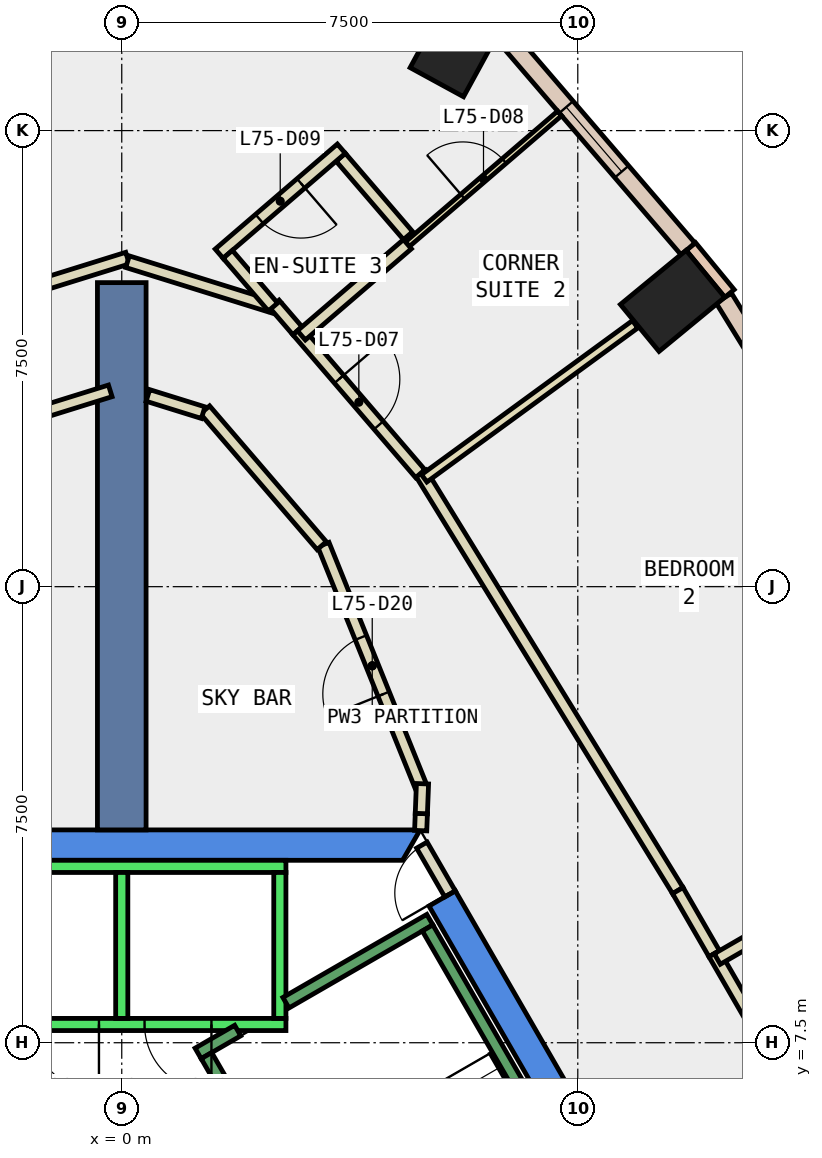
"""IFC4 building model, lengths in metres.
Left out: names, types, materials, properties, quantities, classifications, styles, units other than length and angle.
Written with IfcOpenShell. Run it as: python <this file> out.ifc"""

import sys

from ifc_helpers import new_model, si_unit, direction, frame, frame_2d, origin, origin_2d, place, context, subcontext, project, spatial, polyline, rectangle, outline, extrude, element, fill, save


model = new_model("IFC4")
c1 = context("Model", 3, precision=1e-05, world=origin(), true_north=direction((0.0, 1.0)))
c2 = subcontext(c1, "Body", "Model", "MODEL_VIEW")
j1 = project(units=[si_unit("LENGTHUNIT", "METRE"), si_unit("PLANEANGLEUNIT", "RADIAN")], contexts=[c1])
p1 = place(None, origin())
s1 = spatial("IfcSite", under=j1, at=p1, CompositionType="ELEMENT")
p2 = place(p1, origin())
s2 = spatial("IfcBuilding", under=s1, at=p2, CompositionType="ELEMENT")
p3 = place(p2, frame((0.0, 0.0, 318.8)))
s3 = spatial("IfcBuildingStorey", under=s2, at=p3, CompositionType="ELEMENT", Elevation=318.8)
for number, where, z_axis, x_axis in (
    (1, (9.059, 19.7, -0.34), (0.0, 0.0, 1.0), (-0.636, 0.772, 0.0)),
    (2, (5.517, 23.911, -0.34), (0.0, 0.0, 1.0), (-0.878, 0.479, 0.0)),
):
    element("IfcColumn", number, at=place(p3, frame(where, z_axis=z_axis, x_axis=x_axis)), inside=s3, PredefinedType="COLUMN", context=c2, shape_type="SweptSolid", body=[
        extrude(rectangle(XDim=1.0, YDim=1.4, at=origin_2d()), origin(), (0.0, 0.0, 1.0), 3.6),
    ])
p4 = place(p3, frame((0.0, 0.0, -0.34)))
e3 = element("IfcWall", 3, at=p4, inside=s3, PredefinedType="SHEAR", context=c2, shape_type="SweptSolid", body=[
    extrude(outline(polyline([(5.486, 9.998), (5.053, 9.748), (9.238, 2.5), (9.815, 2.5), (5.486, 9.998)])), origin(), (0.0, 0.0, 1.0), 3.6),
])
p5 = place(p3, frame((0.0, 0.0, -0.34)))
e4 = element("IfcWall", 4, at=p5, inside=s3, PredefinedType="SHEAR", context=c2, shape_type="SweptSolid", body=[
    extrude(outline(polyline([(4.907, 11.0), (-4.907, 11.0), (-4.619, 10.5), (4.619, 10.5), (4.907, 11.0)])), origin(), (0.0, 0.0, 1.0), 3.6),
])
p6 = place(p3, frame((0.0, 11.0, -0.34), z_axis=(0.0, 0.0, 1.0), x_axis=(0.0, 1.0, 0.0)))
e5 = element("IfcWall", 5, at=p6, inside=s3, PredefinedType="SHEAR", context=c2, shape_type="SweptSolid", body=[
    extrude(rectangle(XDim=9.0, YDim=0.8, at=frame_2d((4.5, 0.0))), origin(), (0.0, 0.0, 1.0), 3.6),
])
p7 = place(p3, frame((9.995, 19.822, 0.0), z_axis=(0.0, 0.0, 1.0), x_axis=(-0.635998056672, 0.771690658172, 0.0)))
e6 = element("IfcWall", 6, at=p7, inside=s3, PredefinedType="STANDARD", context=c2, shape_type="SweptSolid", body=[
    extrude(rectangle(XDim=1.0, YDim=0.2, at=frame_2d((0.5, 0.0))), origin(), (0.0, 0.0, 1.0), 3.26),
])
p8 = place(p3, frame((13.823, 13.372, 0.0), z_axis=(0.0, 0.0, 1.0), x_axis=(-0.524004608874, 0.851715427757, 0.0)))
e7 = element("IfcWall", 7, at=p8, inside=s3, PredefinedType="STANDARD", context=c2, shape_type="SweptSolid", body=[
    extrude(rectangle(XDim=7.485, YDim=0.3, at=frame_2d((3.742, 0.0))), origin(), (0.0, 0.0, 1.0), 3.26),
])
p9 = place(p8, frame((0.771, 0.0, 0.9)))
e8 = element("IfcOpeningElement", 8, at=p9, cuts=e7, PredefinedType="OPENING", context=c2, shape_type="SweptSolid", body=[
    extrude(rectangle(XDim=2.2, YDim=2.0, at=frame_2d((1.1, 1.0))), frame((0.0, 0.16, 0.0), z_axis=(0.0, -1.0, 0.0), x_axis=(1.0, 0.0, 0.0)), (0.0, 0.0, 1.0), 0.32),
])
p10 = place(p8, frame((4.514, 0.0, 0.9)))
e9 = element("IfcOpeningElement", 9, at=p10, cuts=e7, PredefinedType="OPENING", context=c2, shape_type="SweptSolid", body=[
    extrude(rectangle(XDim=2.2, YDim=2.0, at=frame_2d((1.1, 1.0))), frame((0.0, 0.16, 0.0), z_axis=(0.0, -1.0, 0.0), x_axis=(1.0, 0.0, 0.0)), (0.0, 0.0, 1.0), 0.32),
])
p11 = place(p3, frame((9.313, 20.555, 0.0), z_axis=(0.0, 0.0, 1.0), x_axis=(-0.651684474108, 0.758490175419, 0.0)))
e10 = element("IfcWall", 10, at=p11, inside=s3, PredefinedType="STANDARD", context=c2, shape_type="SweptSolid", body=[
    extrude(rectangle(XDim=4.748, YDim=0.3, at=frame_2d((2.374, 0.0))), origin(), (0.0, 0.0, 1.0), 3.26),
])
p12 = place(p11, frame((1.674, 0.0, 0.9)))
e11 = element("IfcOpeningElement", 11, at=p12, cuts=e10, PredefinedType="OPENING", context=c2, shape_type="SweptSolid", body=[
    extrude(rectangle(XDim=1.4, YDim=2.0, at=frame_2d((0.7, 1.0))), frame((0.0, 0.16, 0.0), z_axis=(0.0, -1.0, 0.0), x_axis=(1.0, 0.0, 0.0)), (0.0, 0.0, 1.0), 0.32),
])
p13 = place(p3, frame((4.916, 10.988, 0.0), z_axis=(0.0, 0.0, 1.0), x_axis=(0.039066592023, 0.999236609311, 0.0)))
e12 = element("IfcWall", 12, at=p13, inside=s3, PredefinedType="PARTITIONING", context=c2, shape_type="SweptSolid", body=[
    extrude(rectangle(XDim=0.281, YDim=0.2, at=frame_2d((0.141, 0.0))), origin(), (0.0, 0.0, 1.0), 2.4),
])
p14 = place(p3, frame((4.923, 11.707, 0.0), z_axis=(0.0, 0.0, 1.0), x_axis=(-0.374122865642, 0.927379146522, 0.0)))
e13 = element("IfcWall", 13, at=p14, inside=s3, PredefinedType="PARTITIONING", context=c2, shape_type="SweptSolid", body=[
    extrude(rectangle(XDim=4.296, YDim=0.2, at=frame_2d((2.148, 0.0))), origin(), (0.0, 0.0, 1.0), 3.26),
])
p15 = place(p14, frame((1.648, 0.0, 0.0)))
e14 = element("IfcOpeningElement", 14, at=p15, cuts=e13, PredefinedType="OPENING", context=c2, shape_type="SweptSolid", body=[
    extrude(rectangle(XDim=1.0, YDim=2.1, at=frame_2d((0.5, 1.05))), frame((0.0, 0.11, 0.0), z_axis=(0.0, -1.0, 0.0), x_axis=(1.0, 0.0, 0.0)), (0.0, 0.0, 1.0), 0.22),
])
p16 = place(p3, frame((3.289, 15.674, 0.0), z_axis=(0.0, 0.0, 1.0), x_axis=(-0.651848676423, 0.758349064116, 0.0)))
e15 = element("IfcWall", 15, at=p16, inside=s3, PredefinedType="PARTITIONING", context=c2, shape_type="SweptSolid", body=[
    extrude(rectangle(XDim=2.946, YDim=0.2, at=frame_2d((1.473, 0.0))), origin(), (0.0, 0.0, 1.0), 3.26),
])
p17 = place(p3, frame((1.339, 17.862, 0.0), z_axis=(0.0, 0.0, 1.0), x_axis=(-0.954826063502, 0.297165254457, 0.0)))
e16 = element("IfcWall", 16, at=p17, inside=s3, PredefinedType="PARTITIONING", context=c2, shape_type="SweptSolid", body=[
    extrude(rectangle(XDim=0.952, YDim=0.2, at=frame_2d((0.476, 0.0))), origin(), (0.0, 0.0, 1.0), 3.26),
])
p18 = place(p3, frame((-0.189, 18.22, 0.0), z_axis=(0.0, 0.0, 1.0), x_axis=(-0.954836332451, -0.297132257137, 0.0)))
e17 = element("IfcWall", 17, at=p18, inside=s3, PredefinedType="PARTITIONING", context=c2, shape_type="SweptSolid", body=[
    extrude(rectangle(XDim=1.205, YDim=0.2, at=frame_2d((0.602, 0.0))), origin(), (0.0, 0.0, 1.0), 3.26),
])
p19 = place(p3, frame((4.922, 16.867, 0.0), z_axis=(0.0, 0.0, 1.0), x_axis=(0.523943621984, -0.851752945978, 0.0)))
e18 = element("IfcWall", 18, at=p19, inside=s3, PredefinedType="PARTITIONING", context=c2, shape_type="SweptSolid", body=[
    extrude(rectangle(XDim=8.06, YDim=0.2, at=frame_2d((4.03, 0.0))), origin(), (0.0, 0.0, 1.0), 3.26),
])
p20 = place(p3, frame((9.145, 10.002, 0.0), z_axis=(0.0, 0.0, 1.0), x_axis=(0.499798886082, -0.866141485827, 0.0)))
e19 = element("IfcWall", 19, at=p20, inside=s3, PredefinedType="PARTITIONING", context=c2, shape_type="SweptSolid", body=[
    extrude(rectangle(XDim=1.198, YDim=0.2, at=frame_2d((0.599, 0.0))), origin(), (0.0, 0.0, 1.0), 3.26),
])
p21 = place(p3, frame((9.744, 8.964, 0.0), z_axis=(0.0, 0.0, 1.0), x_axis=(0.500290307618, -0.865857729713, 0.0)))
e20 = element("IfcWall", 20, at=p21, inside=s3, PredefinedType="PARTITIONING", context=c2, shape_type="SweptSolid", body=[
    extrude(rectangle(XDim=3.2, YDim=0.2, at=frame_2d((1.6, 0.0))), origin(), (0.0, 0.0, 1.0), 3.26),
])
p22 = place(p3, frame((2.889, 19.209, 0.0), z_axis=(0.0, 0.0, 1.0), x_axis=(0.651686040861, -0.758488829283, 0.0)))
e21 = element("IfcWall", 21, at=p22, inside=s3, PredefinedType="PARTITIONING", context=c2, shape_type="SweptSolid", body=[
    extrude(rectangle(XDim=3.1, YDim=0.2, at=frame_2d((1.55, 0.0))), origin(), (0.0, 0.0, 1.0), 3.26),
])
p23 = place(p22, frame((1.05, 0.0, 0.0)))
e22 = element("IfcOpeningElement", 22, at=p23, cuts=e21, PredefinedType="OPENING", context=c2, shape_type="SweptSolid", body=[
    extrude(rectangle(XDim=1.0, YDim=2.1, at=frame_2d((0.5, 1.05))), frame((0.0, 0.11, 0.0), z_axis=(0.0, -1.0, 0.0), x_axis=(1.0, 0.0, 0.0)), (0.0, 0.0, 1.0), 0.22),
])
p24 = place(p3, frame((-2.482, 19.601, 0.0), z_axis=(0.0, 0.0, 1.0), x_axis=(0.95482540871, 0.297167358372, 0.0)))
e23 = element("IfcWall", 23, at=p24, inside=s3, PredefinedType="PARTITIONING", context=c2, shape_type="SweptSolid", body=[
    extrude(rectangle(XDim=2.699, YDim=0.2, at=frame_2d((1.349, 0.0))), origin(), (0.0, 0.0, 1.0), 3.26),
])
p25 = place(p3, frame((0.095, 20.344, 0.0), z_axis=(0.0, 0.0, 1.0), x_axis=(0.954837867825, -0.297127323158, 0.0)))
e24 = element("IfcWall", 24, at=p25, inside=s3, PredefinedType="PARTITIONING", context=c2, shape_type="SweptSolid", body=[
    extrude(rectangle(XDim=2.605, YDim=0.2, at=frame_2d((1.302, 0.0))), origin(), (0.0, 0.0, 1.0), 3.26),
])
p26 = place(p3, frame((2.512, 19.647, 0.0), z_axis=(0.0, 0.0, 1.0), x_axis=(0.652320947019, -0.757942862016, 0.0)))
e25 = element("IfcWall", 25, at=p26, inside=s3, PredefinedType="PARTITIONING", context=c2, shape_type="SweptSolid", body=[
    extrude(rectangle(XDim=0.578, YDim=0.2, at=frame_2d((0.289, 0.0))), origin(), (0.0, 0.0, 1.0), 3.26),
])
p27 = place(p3, frame((11.959, 10.127, 0.0), z_axis=(0.0, 0.0, 1.0), x_axis=(-0.866022959057, -0.500004234368, 0.0)))
e26 = element("IfcWall", 26, at=p27, inside=s3, PredefinedType="PARTITIONING", context=c2, shape_type="SweptSolid", body=[
    extrude(rectangle(XDim=2.5, YDim=0.2, at=frame_2d((1.25, 0.0))), origin(), (0.0, 0.0, 1.0), 3.26),
])
p28 = place(p3, frame((4.974, 16.782, 0.0), z_axis=(0.0, 0.0, 1.0), x_axis=(0.807621211013, 0.589701602102, 0.0)))
e27 = element("IfcWall", 27, at=p28, inside=s3, PredefinedType="PARTITIONING", context=c2, shape_type="SweptSolid", body=[
    extrude(rectangle(XDim=4.295, YDim=0.15, at=frame_2d((2.148, 0.0))), origin(), (0.0, 0.0, 1.0), 3.26),
])
p29 = place(p3, frame((4.698, 20.632, 0.0), z_axis=(0.0, 0.0, 1.0), x_axis=(0.75843091069, 0.651753445491, 0.0)))
e28 = element("IfcWall", 28, at=p29, inside=s3, PredefinedType="PARTITIONING", context=c2, shape_type="SweptSolid", body=[
    extrude(rectangle(XDim=3.3, YDim=0.1, at=frame_2d((1.65, 0.0))), origin(), (0.0, 0.0, 1.0), 3.26),
])
p30 = place(p29, frame((1.2, 0.0, 0.0)))
e29 = element("IfcOpeningElement", 29, at=p30, cuts=e28, PredefinedType="OPENING", context=c2, shape_type="SweptSolid", body=[
    extrude(rectangle(XDim=0.9, YDim=2.1, at=frame_2d((0.45, 1.05))), frame((0.0, 0.06, 0.0), z_axis=(0.0, -1.0, 0.0), x_axis=(1.0, 0.0, 0.0)), (0.0, 0.0, 1.0), 0.12),
])
p31 = place(p3, frame((2.954, 19.133, 0.0), z_axis=(0.0, 0.0, 1.0), x_axis=(0.758341579104, 0.65185738425, 0.0)))
e30 = element("IfcWall", 30, at=p31, inside=s3, PredefinedType="PARTITIONING", context=c2, shape_type="SweptSolid", body=[
    extrude(rectangle(XDim=2.3, YDim=0.2, at=frame_2d((1.15, 0.0))), origin(), (0.0, 0.0, 1.0), 3.26),
])
p32 = place(p3, frame((4.709, 20.773, 0.0), z_axis=(0.0, 0.0, 1.0), x_axis=(-0.651808051275, 0.758383982092, 0.0)))
e31 = element("IfcWall", 31, at=p32, inside=s3, PredefinedType="PARTITIONING", context=c2, shape_type="SweptSolid", body=[
    extrude(rectangle(XDim=1.7, YDim=0.2, at=frame_2d((0.85, 0.0))), origin(), (0.0, 0.0, 1.0), 3.26),
])
p33 = place(p3, frame((3.611, 22.203, 0.0), z_axis=(0.0, 0.0, 1.0), x_axis=(-0.75836467248, -0.651830517493, 0.0)))
e32 = element("IfcWall", 32, at=p33, inside=s3, PredefinedType="PARTITIONING", context=c2, shape_type="SweptSolid", body=[
    extrude(rectangle(XDim=2.649, YDim=0.2, at=frame_2d((1.325, 0.0))), origin(), (0.0, 0.0, 1.0), 3.26),
])
p34 = place(p33, frame((0.875, 0.0, 0.0)))
e33 = element("IfcOpeningElement", 33, at=p34, cuts=e32, PredefinedType="OPENING", context=c2, shape_type="SweptSolid", body=[
    extrude(rectangle(XDim=0.9, YDim=2.1, at=frame_2d((0.45, 1.05))), frame((0.0, 0.11, 0.0), z_axis=(0.0, -1.0, 0.0), x_axis=(1.0, 0.0, 0.0)), (0.0, 0.0, 1.0), 0.22),
])
p35 = place(p3, frame((1.743, 20.465, 0.0), z_axis=(0.0, 0.0, 1.0), x_axis=(0.65174176003, -0.758440952371, 0.0)))
e34 = element("IfcWall", 34, at=p35, inside=s3, PredefinedType="PARTITIONING", context=c2, shape_type="SweptSolid", body=[
    extrude(rectangle(XDim=1.142, YDim=0.2, at=frame_2d((0.571, 0.0))), origin(), (0.0, 0.0, 1.0), 3.26),
])
p36 = place(p3, frame((5.399, 9.948, 0.0), z_axis=(0.0, 0.0, 1.0), x_axis=(-0.499882215713, 0.866093395895, 0.0)))
e35 = element("IfcWall", 35, at=p36, inside=s3, PredefinedType="PARTITIONING", context=c2, shape_type="SweptSolid", body=[
    extrude(rectangle(XDim=0.926, YDim=0.2, at=frame_2d((0.463, 0.0))), origin(), (0.0, 0.0, 1.0), 2.4),
])
p37 = place(p36, frame((0.017, 0.0, 0.0)))
e36 = element("IfcOpeningElement", 36, at=p37, cuts=e35, PredefinedType="OPENING", context=c2, shape_type="SweptSolid", body=[
    extrude(rectangle(XDim=0.9, YDim=2.1, at=frame_2d((0.45, 1.05))), frame((0.0, 0.11, 0.0), z_axis=(0.0, -1.0, 0.0), x_axis=(1.0, 0.0, 0.0)), (0.0, 0.0, 1.0), 0.22),
])
p38 = place(p3, frame((4.927, 11.269, 0.0), z_axis=(0.0, 0.0, 1.0), x_axis=(0.038834659047, 0.999245650106, 0.0)))
e37 = element("IfcWall", 37, at=p38, inside=s3, PredefinedType="PARTITIONING", context=c2, shape_type="SweptSolid", body=[
    extrude(rectangle(XDim=0.49, YDim=0.2, at=frame_2d((0.245, 0.0))), origin(), (0.0, 0.0, 1.0), 3.26),
])
p39 = place(p3, frame((2.7, 7.8, 0.0), z_axis=(0.0, 0.0, 1.0), x_axis=(-1.0, 0.0, 0.0)))
e38 = element("IfcWall", 38, at=p39, inside=s3, PredefinedType="STANDARD", context=c2, shape_type="SweptSolid", body=[
    extrude(rectangle(XDim=5.4, YDim=0.2, at=frame_2d((2.7, 0.0))), origin(), (0.0, 0.0, 1.0), 3.26),
])
p40 = place(p39, frame((1.225, 0.0, 0.0)))
e39 = element("IfcOpeningElement", 39, at=p40, cuts=e38, PredefinedType="OPENING", context=c2, shape_type="SweptSolid", body=[
    extrude(rectangle(XDim=1.1, YDim=2.1, at=frame_2d((0.55, 1.05))), frame((0.0, 0.11, 0.0), z_axis=(0.0, -1.0, 0.0), x_axis=(1.0, 0.0, 0.0)), (0.0, 0.0, 1.0), 0.22),
])
p41 = place(p39, frame((3.075, 0.0, 0.0)))
e40 = element("IfcOpeningElement", 40, at=p41, cuts=e38, PredefinedType="OPENING", context=c2, shape_type="SweptSolid", body=[
    extrude(rectangle(XDim=1.1, YDim=2.1, at=frame_2d((0.55, 1.05))), frame((0.0, 0.11, 0.0), z_axis=(0.0, -1.0, 0.0), x_axis=(1.0, 0.0, 0.0)), (0.0, 0.0, 1.0), 0.22),
])
p42 = place(p3, frame((2.7, 10.4, 0.0), z_axis=(0.0, 0.0, 1.0), x_axis=(-1.0, 0.0, 0.0)))
e41 = element("IfcWall", 41, at=p42, inside=s3, PredefinedType="STANDARD", context=c2, shape_type="SweptSolid", body=[
    extrude(rectangle(XDim=5.4, YDim=0.2, at=frame_2d((2.7, 0.0))), origin(), (0.0, 0.0, 1.0), 3.26),
])
for number, where, z_axis, x_axis in (
    (42, (2.6, 7.9, 0.0), (0.0, 0.0, 1.0), (0.0, 1.0, 0.0)),
    (43, (0.0, 7.9, 0.0), (0.0, 0.0, 1.0), (0.0, 1.0, 0.0)),
):
    element("IfcWall", number, at=place(p3, frame(where, z_axis=z_axis, x_axis=x_axis)), inside=s3, PredefinedType="STANDARD", context=c2, shape_type="SweptSolid", body=[
        extrude(rectangle(XDim=2.4, YDim=0.2, at=frame_2d((1.2, 0.0))), origin(), (0.0, 0.0, 1.0), 3.26),
    ])
p43 = place(p3, frame((2.7, 8.158, 0.0), z_axis=(0.0, 0.0, 1.0), x_axis=(0.86611865017, 0.499838457731, 0.0)))
e44 = element("IfcWall", 44, at=p43, inside=s3, PredefinedType="STANDARD", context=c2, shape_type="SweptSolid", body=[
    extrude(rectangle(XDim=2.733, YDim=0.2, at=frame_2d((1.366, 0.0))), origin(), (0.0, 0.0, 1.0), 3.26),
])
p44 = place(p3, frame((1.256, 7.324, 0.0), z_axis=(0.0, 0.0, 1.0), x_axis=(0.865915093549, 0.500191014278, 0.0)))
e45 = element("IfcWall", 45, at=p44, inside=s3, PredefinedType="STANDARD", context=c2, shape_type="SweptSolid", body=[
    extrude(rectangle(XDim=0.752, YDim=0.2, at=frame_2d((0.376, 0.0))), origin(), (0.0, 0.0, 1.0), 3.26),
])
p45 = place(p3, frame((4.843, 1.312, 0.0), z_axis=(0.0, 0.0, 1.0), x_axis=(-0.499963383562, 0.866046543262, 0.0)))
e46 = element("IfcWall", 46, at=p45, inside=s3, PredefinedType="STANDARD", context=c2, shape_type="SweptSolid", body=[
    extrude(rectangle(XDim=6.9, YDim=0.2, at=frame_2d((3.45, 0.0))), origin(), (0.0, 0.0, 1.0), 3.26),
])
p46 = place(p45, frame((0.45, 0.0, 0.0)))
e47 = element("IfcOpeningElement", 47, at=p46, cuts=e46, PredefinedType="OPENING", context=c2, shape_type="SweptSolid", body=[
    extrude(rectangle(XDim=1.1, YDim=2.2, at=frame_2d((0.55, 1.1))), frame((0.0, 0.11, 0.0), z_axis=(0.0, -1.0, 0.0), x_axis=(1.0, 0.0, 0.0)), (0.0, 0.0, 1.0), 0.22),
])
p47 = place(p3, frame((8.48, 3.412, 0.0), z_axis=(0.0, 0.0, 1.0), x_axis=(-0.499978703459, 0.866037698999, 0.0)))
e48 = element("IfcWall", 48, at=p47, inside=s3, PredefinedType="STANDARD", context=c2, shape_type="SweptSolid", body=[
    extrude(rectangle(XDim=6.9, YDim=0.2, at=frame_2d((3.45, 0.0))), origin(), (0.0, 0.0, 1.0), 3.26),
])
p48 = place(p12, origin())
e49 = element("IfcWindow", 49, at=p48, inside=s3, PartitioningType="SINGLE_PANEL", PredefinedType="WINDOW", context=c2, shape_type="SweptSolid", body=[
    extrude(rectangle(XDim=1.4, YDim=2.0, at=frame_2d((0.7, 1.0))), frame((0.0, 0.03, 0.0), z_axis=(0.0, -1.0, 0.0), x_axis=(1.0, 0.0, 0.0)), (0.0, 0.0, 1.0), 0.06),
])
fill(e11, e49)
p49 = place(p23, origin())
e50 = element("IfcDoor", 50, at=p49, inside=s3, OperationType="SINGLE_SWING_LEFT", PredefinedType="DOOR", context=c2, shape_type="SweptSolid", body=[
    extrude(rectangle(XDim=1.0, YDim=2.1, at=frame_2d((0.5, 1.05))), frame((0.0, 0.025, 0.0), z_axis=(0.0, -1.0, 0.0), x_axis=(1.0, 0.0, 0.0)), (0.0, 0.0, 1.0), 0.05),
])
fill(e22, e50)
p50 = place(p30, origin())
e51 = element("IfcDoor", 51, at=p50, inside=s3, OperationType="SINGLE_SWING_RIGHT", PredefinedType="DOOR", context=c2, shape_type="SweptSolid", body=[
    extrude(rectangle(XDim=0.9, YDim=2.1, at=frame_2d((0.45, 1.05))), frame((0.0, 0.025, 0.0), z_axis=(0.0, -1.0, 0.0), x_axis=(1.0, 0.0, 0.0)), (0.0, 0.0, 1.0), 0.05),
])
fill(e29, e51)
p51 = place(p34, origin())
e52 = element("IfcDoor", 52, at=p51, inside=s3, OperationType="SINGLE_SWING_LEFT", PredefinedType="DOOR", context=c2, shape_type="SweptSolid", body=[
    extrude(rectangle(XDim=0.9, YDim=2.1, at=frame_2d((0.45, 1.05))), frame((0.0, 0.025, 0.0), z_axis=(0.0, -1.0, 0.0), x_axis=(1.0, 0.0, 0.0)), (0.0, 0.0, 1.0), 0.05),
])
fill(e33, e52)
p52 = place(p15, origin())
e53 = element("IfcDoor", 53, at=p52, inside=s3, OperationType="SINGLE_SWING_LEFT", PredefinedType="DOOR", context=c2, shape_type="SweptSolid", body=[
    extrude(rectangle(XDim=1.0, YDim=2.1, at=frame_2d((0.5, 1.05))), frame((0.0, 0.025, 0.0), z_axis=(0.0, -1.0, 0.0), x_axis=(1.0, 0.0, 0.0)), (0.0, 0.0, 1.0), 0.05),
])
fill(e14, e53)
p53 = place(p37, origin())
e54 = element("IfcDoor", 54, at=p53, inside=s3, OperationType="SINGLE_SWING_LEFT", PredefinedType="DOOR", context=c2, shape_type="SweptSolid", body=[
    extrude(rectangle(XDim=0.9, YDim=2.1, at=frame_2d((0.45, 1.05))), frame((0.0, 0.025, 0.0), z_axis=(0.0, -1.0, 0.0), x_axis=(1.0, 0.0, 0.0)), (0.0, 0.0, 1.0), 0.05),
])
fill(e36, e54)
p54 = place(p40, origin())
e55 = element("IfcDoor", 55, at=p54, inside=s3, OperationType="SLIDING_TO_LEFT", PredefinedType="DOOR", context=c2, shape_type="SweptSolid", body=[
    extrude(rectangle(XDim=1.1, YDim=2.1, at=frame_2d((0.55, 1.05))), frame((0.0, 0.025, 0.0), z_axis=(0.0, -1.0, 0.0), x_axis=(1.0, 0.0, 0.0)), (0.0, 0.0, 1.0), 0.05),
])
fill(e39, e55)
p55 = place(p41, origin())
e56 = element("IfcDoor", 56, at=p55, inside=s3, OperationType="SLIDING_TO_LEFT", PredefinedType="DOOR", context=c2, shape_type="SweptSolid", body=[
    extrude(rectangle(XDim=1.1, YDim=2.1, at=frame_2d((0.55, 1.05))), frame((0.0, 0.025, 0.0), z_axis=(0.0, -1.0, 0.0), x_axis=(1.0, 0.0, 0.0)), (0.0, 0.0, 1.0), 0.05),
])
fill(e40, e56)
save(model, sys.argv[1])
